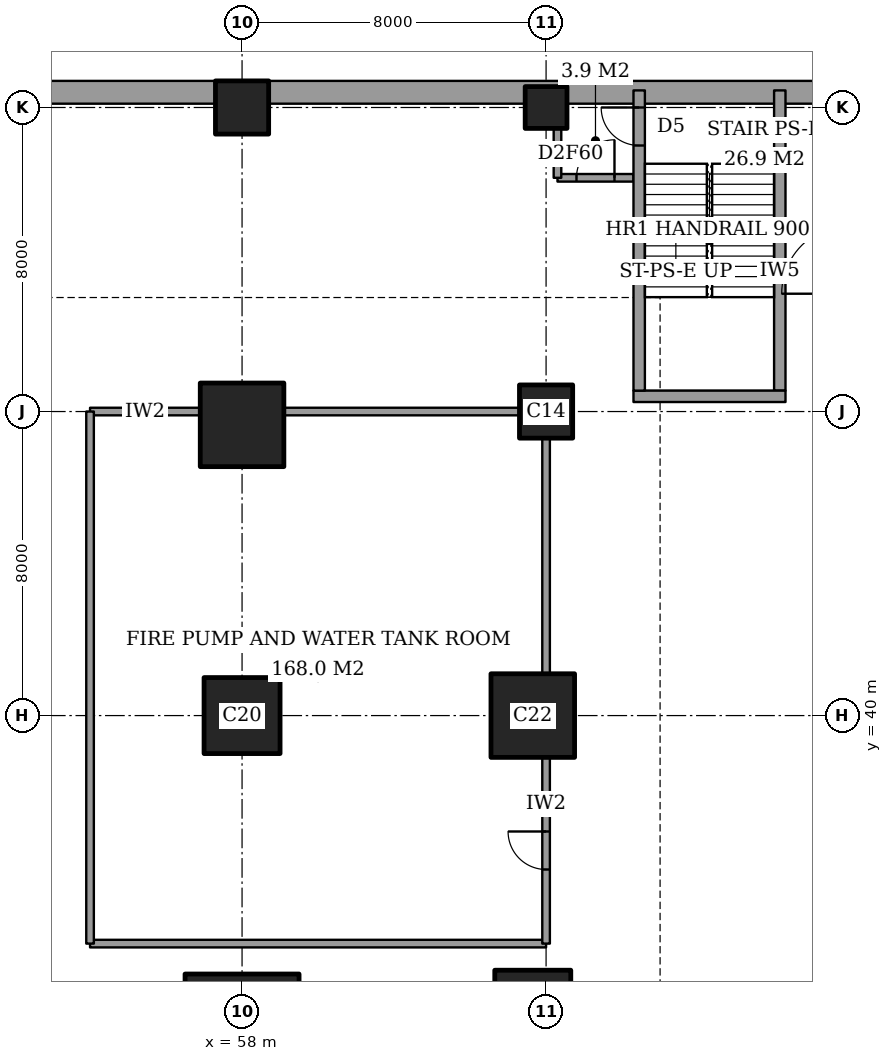
"""IFC4 building model, lengths in metres.
Left out: names, types, materials, properties, quantities, classifications, styles, units other than length and angle.
Written with IfcOpenShell. Run it as: python <this file> out.ifc"""

import sys

from ifc_helpers import new_model, si_unit, direction, frame, frame_2d, origin, origin_2d, place, context, subcontext, project, spatial, rectangle, extrude, element, fill, save


model = new_model("IFC4")
c1 = context("Model", 3, precision=1e-05, world=origin(), true_north=direction((0.0, 1.0)))
c2 = subcontext(c1, "Body", "Model", "MODEL_VIEW")
j1 = project(units=[si_unit("LENGTHUNIT", "METRE"), si_unit("PLANEANGLEUNIT", "RADIAN")], contexts=[c1])
p1 = place(None, origin())
s1 = spatial("IfcSite", under=j1, at=p1, CompositionType="ELEMENT")
p2 = place(p1, origin())
s2 = spatial("IfcBuilding", under=s1, at=p2, CompositionType="ELEMENT")
p3 = place(p2, frame((0.0, 0.0, -5.0)))
s3 = spatial("IfcBuildingStorey", under=s2, at=p3, CompositionType="ELEMENT", Elevation=-5.0)
p4 = place(p3, frame((-16.7, 56.4, -0.4), z_axis=(0.0, 0.0, 1.0), x_axis=(1.0, 0.0, 0.0)))
e1 = element("IfcWall", 1, at=p4, inside=s3, PredefinedType="USERDEFINED", context=c2, shape_type="SweptSolid", body=[
    extrude(rectangle(XDim=92.2, YDim=0.6, at=frame_2d((46.1, 0.0))), origin(), (0.0, 0.0, 1.0), 5.4),
])
p5 = place(p3, frame((58.0, 32.0, 0.0), z_axis=(0.0, 0.0, 1.0), x_axis=(1.0, 0.0, 0.0)))
e2 = element("IfcColumn", 2, at=p5, inside=s3, PredefinedType="COLUMN", context=c2, shape_type="SweptSolid", body=[
    extrude(rectangle(XDim=3.0, YDim=2.4, at=origin_2d()), origin(), (0.0, 0.0, 1.0), 5.0),
])
p6 = place(p3, frame((58.0, 40.0, 0.0), z_axis=(0.0, 0.0, 1.0), x_axis=(1.0, 0.0, 0.0)))
e3 = element("IfcColumn", 3, at=p6, inside=s3, PredefinedType="COLUMN", context=c2, shape_type="SweptSolid", body=[
    extrude(rectangle(XDim=2.0, YDim=2.0, at=origin_2d()), origin(), (0.0, 0.0, 1.0), 5.0),
])
p7 = place(p3, frame((58.0, 47.65, 0.0), z_axis=(0.0, 0.0, 1.0), x_axis=(1.0, 0.0, 0.0)))
e4 = element("IfcColumn", 4, at=p7, inside=s3, PredefinedType="COLUMN", context=c2, shape_type="SweptSolid", body=[
    extrude(rectangle(XDim=2.2, YDim=2.2, at=origin_2d()), origin(), (0.0, 0.0, 1.0), 5.0),
])
p8 = place(p3, frame((58.0, 56.0, -0.4), z_axis=(0.0, 0.0, 1.0), x_axis=(1.0, 0.0, 0.0)))
e5 = element("IfcColumn", 5, at=p8, inside=s3, PredefinedType="COLUMN", context=c2, shape_type="SweptSolid", body=[
    extrude(rectangle(XDim=1.4, YDim=1.4, at=origin_2d()), origin(), (0.0, 0.0, 1.0), 5.4),
])
p9 = place(p3, frame((65.65, 32.0, 0.0), z_axis=(0.0, 0.0, 1.0), x_axis=(0.0, 1.0, 0.0)))
e6 = element("IfcColumn", 6, at=p9, inside=s3, PredefinedType="COLUMN", context=c2, shape_type="SweptSolid", body=[
    extrude(rectangle(XDim=2.6, YDim=2.0, at=origin_2d()), origin(), (0.0, 0.0, 1.0), 5.0),
])
p10 = place(p3, frame((65.65, 40.0, 0.0), z_axis=(0.0, 0.0, 1.0), x_axis=(1.0, 0.0, 0.0)))
e7 = element("IfcColumn", 7, at=p10, inside=s3, PredefinedType="COLUMN", context=c2, shape_type="SweptSolid", body=[
    extrude(rectangle(XDim=2.2, YDim=2.2, at=origin_2d()), origin(), (0.0, 0.0, 1.0), 5.0),
])
p11 = place(p3, frame((66.0, 48.0, 0.0), z_axis=(0.0, 0.0, 1.0), x_axis=(1.0, 0.0, 0.0)))
e8 = element("IfcColumn", 8, at=p11, inside=s3, PredefinedType="COLUMN", context=c2, shape_type="SweptSolid", body=[
    extrude(rectangle(XDim=1.4, YDim=1.4, at=origin_2d()), origin(), (0.0, 0.0, 1.0), 5.0),
])
p12 = place(p3, frame((66.0, 56.0, -0.4), z_axis=(0.0, 0.0, 1.0), x_axis=(1.0, 0.0, 0.0)))
e9 = element("IfcColumn", 9, at=p12, inside=s3, PredefinedType="COLUMN", context=c2, shape_type="SweptSolid", body=[
    extrude(rectangle(XDim=1.1, YDim=1.1, at=origin_2d()), origin(), (0.0, 0.0, 1.0), 5.4),
])
p13 = place(p3, frame((54.0, 34.0, 0.0), z_axis=(0.0, 0.0, 1.0), x_axis=(1.0, 0.0, 0.0)))
e10 = element("IfcWall", 10, at=p13, inside=s3, PredefinedType="PARTITIONING", context=c2, shape_type="SweptSolid", body=[
    extrude(rectangle(XDim=12.0, YDim=0.2, at=frame_2d((6.0, 0.0))), origin(), (0.0, 0.0, 1.0), 4.7),
])
p14 = place(p3, frame((54.0, 48.0, 0.0), z_axis=(0.0, 0.0, 1.0), x_axis=(1.0, 0.0, 0.0)))
e11 = element("IfcWall", 11, at=p14, inside=s3, PredefinedType="PARTITIONING", context=c2, shape_type="SweptSolid", body=[
    extrude(rectangle(XDim=2.9, YDim=0.2, at=frame_2d((1.45, 0.0))), origin(), (0.0, 0.0, 1.0), 3.3),
])
p15 = place(p3, frame((59.1, 48.0, 0.0), z_axis=(0.0, 0.0, 1.0), x_axis=(1.0, 0.0, 0.0)))
e12 = element("IfcWall", 12, at=p15, inside=s3, PredefinedType="PARTITIONING", context=c2, shape_type="SweptSolid", body=[
    extrude(rectangle(XDim=6.2, YDim=0.2, at=frame_2d((3.1, 0.0))), origin(), (0.0, 0.0, 1.0), 3.3),
])
p16 = place(p3, frame((66.3, 54.15, 0.0), z_axis=(0.0, 0.0, 1.0), x_axis=(1.0, 0.0, 0.0)))
e13 = element("IfcWall", 13, at=p16, inside=s3, PredefinedType="PARTITIONING", context=c2, shape_type="SweptSolid", body=[
    extrude(rectangle(XDim=2.0, YDim=0.2, at=frame_2d((1.0, 0.0))), origin(), (0.0, 0.0, 1.0), 4.7),
])
p17 = place(p16, frame((0.5, 0.0, 0.0)))
e14 = element("IfcOpeningElement", 14, at=p17, cuts=e13, PredefinedType="OPENING", context=c2, shape_type="SweptSolid", body=[
    extrude(rectangle(XDim=1.0, YDim=2.1, at=frame_2d((0.5, 1.05))), frame((0.0, 0.11, 0.0), z_axis=(0.0, -1.0, 0.0), x_axis=(1.0, 0.0, 0.0)), (0.0, 0.0, 1.0), 0.22),
])
p18 = place(p3, frame((54.0, 34.0, 0.0), z_axis=(0.0, 0.0, 1.0), x_axis=(0.0, 1.0, 0.0)))
e15 = element("IfcWall", 15, at=p18, inside=s3, PredefinedType="PARTITIONING", context=c2, shape_type="SweptSolid", body=[
    extrude(rectangle(XDim=14.0, YDim=0.2, at=frame_2d((7.0, 0.0))), origin(), (0.0, 0.0, 1.0), 4.7),
])
p19 = place(p3, frame((66.0, 34.0, 0.0), z_axis=(0.0, 0.0, 1.0), x_axis=(0.0, 1.0, 0.0)))
e16 = element("IfcWall", 16, at=p19, inside=s3, PredefinedType="PARTITIONING", context=c2, shape_type="SweptSolid", body=[
    extrude(rectangle(XDim=4.9, YDim=0.2, at=frame_2d((2.45, 0.0))), origin(), (0.0, 0.0, 1.0), 3.3),
])
p20 = place(p19, frame((1.95, 0.0, 0.0)))
e17 = element("IfcOpeningElement", 17, at=p20, cuts=e16, PredefinedType="OPENING", context=c2, shape_type="SweptSolid", body=[
    extrude(rectangle(XDim=1.0, YDim=2.1, at=frame_2d((0.5, 1.05))), frame((0.0, 0.11, 0.0), z_axis=(0.0, -1.0, 0.0), x_axis=(1.0, 0.0, 0.0)), (0.0, 0.0, 1.0), 0.22),
])
p21 = place(p3, frame((66.0, 41.1, 0.0), z_axis=(0.0, 0.0, 1.0), x_axis=(0.0, 1.0, 0.0)))
e18 = element("IfcWall", 18, at=p21, inside=s3, PredefinedType="PARTITIONING", context=c2, shape_type="SweptSolid", body=[
    extrude(rectangle(XDim=6.2, YDim=0.2, at=frame_2d((3.1, 0.0))), origin(), (0.0, 0.0, 1.0), 3.3),
])
p22 = place(p3, frame((66.3, 54.15, 0.0), z_axis=(0.0, 0.0, 1.0), x_axis=(0.0, 1.0, 0.0)))
e19 = element("IfcWall", 19, at=p22, inside=s3, PredefinedType="PARTITIONING", context=c2, shape_type="SweptSolid", body=[
    extrude(rectangle(XDim=1.3, YDim=0.2, at=frame_2d((0.65, 0.0))), origin(), (0.0, 0.0, 1.0), 3.3),
])
p23 = place(p3, frame((68.3, 48.4, 0.0), z_axis=(0.0, 0.0, 1.0), x_axis=(1.0, 0.0, 0.0)))
e20 = element("IfcWall", 20, at=p23, inside=s3, PredefinedType="PARTITIONING", context=c2, shape_type="SweptSolid", body=[
    extrude(rectangle(XDim=4.0, YDim=0.3, at=frame_2d((2.0, 0.0))), origin(), (0.0, 0.0, 1.0), 5.0),
])
p24 = place(p3, frame((68.45, 48.55, 0.0), z_axis=(0.0, 0.0, 1.0), x_axis=(0.0, 1.0, 0.0)))
e21 = element("IfcWall", 21, at=p24, inside=s3, PredefinedType="PARTITIONING", context=c2, shape_type="SweptSolid", body=[
    extrude(rectangle(XDim=7.9, YDim=0.3, at=frame_2d((3.95, 0.0))), origin(), (0.0, 0.0, 1.0), 5.0),
])
p25 = place(p24, frame((6.45, 0.0, 0.0)))
e22 = element("IfcOpeningElement", 22, at=p25, cuts=e21, PredefinedType="OPENING", context=c2, shape_type="SweptSolid", body=[
    extrude(rectangle(XDim=1.0, YDim=2.1, at=frame_2d((0.5, 1.05))), frame((0.0, 0.16, 0.0), z_axis=(0.0, -1.0, 0.0), x_axis=(1.0, 0.0, 0.0)), (0.0, 0.0, 1.0), 0.32),
])
p26 = place(p3, frame((72.15, 48.55, 0.0), z_axis=(0.0, 0.0, 1.0), x_axis=(0.0, 1.0, 0.0)))
e23 = element("IfcWall", 23, at=p26, inside=s3, PredefinedType="PARTITIONING", context=c2, shape_type="SweptSolid", body=[
    extrude(rectangle(XDim=7.9, YDim=0.3, at=frame_2d((3.95, 0.0))), origin(), (0.0, 0.0, 1.0), 5.0),
])
p27 = place(p20, origin())
e24 = element("IfcDoor", 24, at=p27, inside=s3, OperationType="SINGLE_SWING_LEFT", PredefinedType="DOOR", context=c2, shape_type="SweptSolid", body=[
    extrude(rectangle(XDim=1.0, YDim=2.1, at=frame_2d((0.5, 1.05))), frame((0.0, 0.025, 0.0), z_axis=(0.0, -1.0, 0.0), x_axis=(1.0, 0.0, 0.0)), (0.0, 0.0, 1.0), 0.05),
])
fill(e17, e24)
p28 = place(p17, origin())
e25 = element("IfcDoor", 25, at=p28, inside=s3, OperationType="SINGLE_SWING_LEFT", PredefinedType="DOOR", context=c2, shape_type="SweptSolid", body=[
    extrude(rectangle(XDim=1.0, YDim=2.1, at=frame_2d((0.5, 1.05))), frame((0.0, 0.025, 0.0), z_axis=(0.0, -1.0, 0.0), x_axis=(1.0, 0.0, 0.0)), (0.0, 0.0, 1.0), 0.05),
])
fill(e14, e25)
p29 = place(p25, origin())
e26 = element("IfcDoor", 26, at=p29, inside=s3, OperationType="SINGLE_SWING_LEFT", PredefinedType="DOOR", context=c2, shape_type="SweptSolid", body=[
    extrude(rectangle(XDim=1.0, YDim=2.1, at=frame_2d((0.5, 1.05))), frame((0.0, 0.025, 0.0), z_axis=(0.0, -1.0, 0.0), x_axis=(1.0, 0.0, 0.0)), (0.0, 0.0, 1.0), 0.05),
])
fill(e22, e26)
save(model, sys.argv[1])
